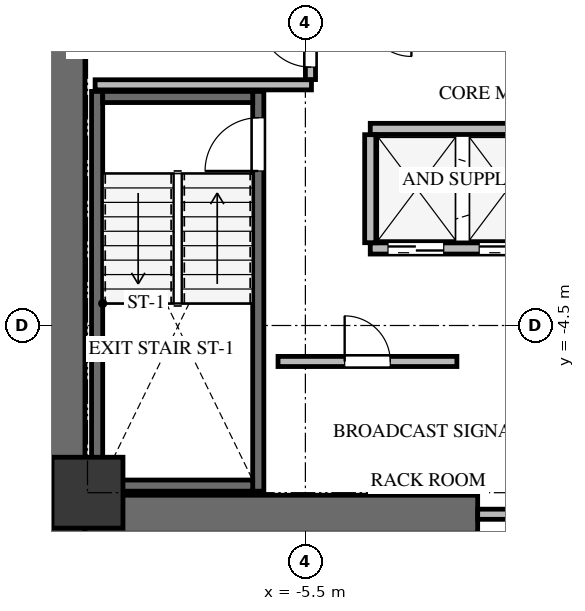
"""IFC4 building model, lengths in metres.
Left out: names, types, materials, properties, quantities, classifications, styles, units other than length and angle.
Written with IfcOpenShell. Run it as: python <this file> out.ifc"""

import sys

from ifc_helpers import new_model, si_unit, direction, frame, frame_2d, origin, origin_2d, place, context, subcontext, project, spatial, rectangle, extrude, source, transform, mapped, element, fill, save


model = new_model("IFC4")
c1 = context("Model", 3, precision=1e-05, world=origin(), true_north=direction((0.0, 1.0)))
c2 = subcontext(c1, "Body", "Model", "MODEL_VIEW")
j1 = project(units=[si_unit("LENGTHUNIT", "METRE"), si_unit("PLANEANGLEUNIT", "RADIAN")], contexts=[c1])
p1 = place(None, origin())
s1 = spatial("IfcSite", under=j1, at=p1, CompositionType="ELEMENT")
p2 = place(p1, origin())
s2 = spatial("IfcBuilding", under=s1, at=p2, CompositionType="ELEMENT")
p3 = place(p2, frame((0.0, 0.0, 104.1)))
s3 = spatial("IfcBuildingStorey", under=s2, at=p3, CompositionType="ELEMENT", Elevation=104.1)
p4 = place(p3, frame((-10.225, -8.6, 0.0), z_axis=(0.0, 0.0, 1.0), x_axis=(0.0, 1.0, 0.0)))
e1 = element("IfcWall", 1, at=p4, inside=s3, PredefinedType="SHEAR", context=c2, shape_type="SweptSolid", body=[
    extrude(rectangle(XDim=17.2, YDim=0.75, at=frame_2d((8.6, 0.0))), origin(), (0.0, 0.0, 1.0), 3.3),
])
p5 = place(p3, frame((-9.85, -8.225, 0.0), z_axis=(0.0, 0.0, 1.0), x_axis=(1.0, 0.0, 0.0)))
e2 = element("IfcWall", 2, at=p5, inside=s3, PredefinedType="SHEAR", context=c2, shape_type="SweptSolid", body=[
    extrude(rectangle(XDim=7.75, YDim=0.75, at=frame_2d((3.875, 0.0))), origin(), (0.0, 0.0, 1.0), 3.3),
])
p6 = place(p3, frame((-6.43, -7.77, -0.24), z_axis=(0.0, 0.0, 1.0), x_axis=(0.0, 1.0, 0.0)))
e3 = element("IfcWall", 3, at=p6, inside=s3, PredefinedType="SHEAR", context=c2, shape_type="SweptSolid", body=[
    extrude(rectangle(XDim=7.89, YDim=0.22, at=frame_2d((3.945, 0.0))), origin(), (0.0, 0.0, 1.0), 3.3),
])
p7 = place(p6, frame((6.32, 0.0, 0.0)))
e4 = element("IfcOpeningElement", 4, at=p7, cuts=e3, PredefinedType="OPENING", context=c2, shape_type="SweptSolid", body=[
    extrude(rectangle(XDim=1.05, YDim=2.15, at=frame_2d((0.525, 1.075))), frame((0.0, 0.12, 0.0), z_axis=(0.0, -1.0, 0.0), x_axis=(1.0, 0.0, 0.0)), (0.0, 0.0, 1.0), 0.24),
])
p8 = place(p3, frame((-9.61, 0.12, -0.24), z_axis=(0.0, 0.0, 1.0), x_axis=(0.0, -1.0, 0.0)))
e5 = element("IfcWall", 5, at=p8, inside=s3, PredefinedType="SHEAR", context=c2, shape_type="SweptSolid", body=[
    extrude(rectangle(XDim=7.89, YDim=0.22, at=frame_2d((3.945, 0.0))), origin(), (0.0, 0.0, 1.0), 3.3),
])
for number, where, z_axis, x_axis in (
    (6, (-9.5, -7.66, -0.24), (0.0, 0.0, 1.0), (1.0, 0.0, 0.0)),
    (7, (-6.54, 0.01, -0.24), (0.0, 0.0, 1.0), (-1.0, 0.0, 0.0)),
):
    element("IfcWall", number, at=place(p3, frame(where, z_axis=z_axis, x_axis=x_axis)), inside=s3, PredefinedType="SHEAR", context=c2, shape_type="SweptSolid", body=[
        extrude(rectangle(XDim=2.96, YDim=0.22, at=frame_2d((1.48, 0.0))), origin(), (0.0, 0.0, 1.0), 3.3),
    ])
m1 = source(origin(), c2, "Body", "SweptSolid", [
    extrude(rectangle(XDim=1.4, YDim=1.4, at=origin_2d()), origin(), (0.0, 0.0, 1.0), 3.3),
])
p9 = place(p3, frame((-9.8, -7.8, -0.24), z_axis=(0.0, 0.0, 1.0), x_axis=(1.0, 0.0, 0.0)))
e8 = element("IfcColumn", 8, at=p9, inside=s3, PredefinedType="COLUMN", context=c2, shape_type="MappedRepresentation", body=[
    mapped(m1, transform((0.0, 0.0, 0.0), x_axis=(1.0, 0.0, 0.0), y_axis=(0.0, 1.0, 0.0), z_axis=(0.0, 0.0, 1.0), scale=1.0)),
])
p10 = place(p3, frame((-2.1, -8.225, 0.0), z_axis=(0.0, 0.0, 1.0), x_axis=(1.0, 0.0, 0.0)))
e9 = element("IfcWall", 9, at=p10, inside=s3, PredefinedType="SOLIDWALL", context=c2, shape_type="SweptSolid", body=[
    extrude(rectangle(XDim=4.2, YDim=0.2, at=frame_2d((2.1, 0.0))), origin(), (0.0, 0.0, 1.0), 3.045),
])
p11 = place(p10, frame((1.2, 0.0, 0.0)))
e10 = element("IfcOpeningElement", 10, at=p11, cuts=e9, PredefinedType="OPENING", context=c2, shape_type="SweptSolid", body=[
    extrude(rectangle(XDim=1.8, YDim=2.15, at=frame_2d((0.9, 1.075))), frame((0.0, 0.11, 0.0), z_axis=(0.0, -1.0, 0.0), x_axis=(1.0, 0.0, 0.0)), (0.0, 0.0, 1.0), 0.22),
])
p12 = place(p3, frame((-9.65, 0.25, 0.0), z_axis=(0.0, 0.0, 1.0), x_axis=(1.0, 0.0, 0.0)))
e11 = element("IfcWall", 11, at=p12, inside=s3, PredefinedType="SOLIDWALL", context=c2, shape_type="SweptSolid", body=[
    extrude(rectangle(XDim=4.27, YDim=0.2, at=frame_2d((2.135, 0.0))), origin(), (0.0, 0.0, 1.0), 3.045),
])
p13 = place(p3, frame((-5.4, 0.354, 0.0), z_axis=(0.0, 0.0, 1.0), x_axis=(0.0, 1.0, 0.0)))
e12 = element("IfcWall", 12, at=p13, inside=s3, PredefinedType="SOLIDWALL", context=c2, shape_type="SweptSolid", body=[
    extrude(rectangle(XDim=4.026, YDim=0.2, at=frame_2d((2.013, 0.0))), origin(), (0.0, 0.0, 1.0), 3.045),
])
p14 = place(p13, frame((0.246, 0.0, 0.0)))
e13 = element("IfcOpeningElement", 13, at=p14, cuts=e12, PredefinedType="OPENING", context=c2, shape_type="SweptSolid", body=[
    extrude(rectangle(XDim=1.0, YDim=2.15, at=frame_2d((0.5, 1.075))), frame((0.0, 0.11, 0.0), z_axis=(0.0, -1.0, 0.0), x_axis=(1.0, 0.0, 0.0)), (0.0, 0.0, 1.0), 0.22),
])
p15 = place(p3, frame((-4.22, -2.98, 0.0), z_axis=(0.0, 0.0, 1.0), x_axis=(1.0, 0.0, 0.0)))
e14 = element("IfcWall", 14, at=p15, inside=s3, PredefinedType="SOLIDWALL", context=c2, shape_type="SweptSolid", body=[
    extrude(rectangle(XDim=7.24, YDim=0.22, at=frame_2d((3.62, 0.0))), origin(), (0.0, 0.0, 1.0), 3.045),
])
p16 = place(p15, frame((0.35, 0.0, 0.0)))
e15 = element("IfcOpeningElement", 15, at=p16, cuts=e14, PredefinedType="OPENING", context=c2, shape_type="SweptSolid", body=[
    extrude(rectangle(XDim=1.1, YDim=2.15, at=frame_2d((0.55, 1.075))), frame((0.0, 0.12, 0.0), z_axis=(0.0, -1.0, 0.0), x_axis=(1.0, 0.0, 0.0)), (0.0, 0.0, 1.0), 0.24),
])
p17 = place(p15, frame((2.15, 0.0, 0.0)))
e16 = element("IfcOpeningElement", 16, at=p17, cuts=e14, PredefinedType="OPENING", context=c2, shape_type="SweptSolid", body=[
    extrude(rectangle(XDim=1.1, YDim=2.15, at=frame_2d((0.55, 1.075))), frame((0.0, 0.12, 0.0), z_axis=(0.0, -1.0, 0.0), x_axis=(1.0, 0.0, 0.0)), (0.0, 0.0, 1.0), 0.24),
])
p18 = place(p15, frame((3.95, 0.0, 0.0)))
e17 = element("IfcOpeningElement", 17, at=p18, cuts=e14, PredefinedType="OPENING", context=c2, shape_type="SweptSolid", body=[
    extrude(rectangle(XDim=1.1, YDim=2.15, at=frame_2d((0.55, 1.075))), frame((0.0, 0.12, 0.0), z_axis=(0.0, -1.0, 0.0), x_axis=(1.0, 0.0, 0.0)), (0.0, 0.0, 1.0), 0.24),
])
p19 = place(p15, frame((5.75, 0.0, 0.0)))
e18 = element("IfcOpeningElement", 18, at=p19, cuts=e14, PredefinedType="OPENING", context=c2, shape_type="SweptSolid", body=[
    extrude(rectangle(XDim=1.1, YDim=2.15, at=frame_2d((0.55, 1.075))), frame((0.0, 0.12, 0.0), z_axis=(0.0, -1.0, 0.0), x_axis=(1.0, 0.0, 0.0)), (0.0, 0.0, 1.0), 0.24),
])
p20 = place(p3, frame((-4.22, -0.62, 0.0), z_axis=(0.0, 0.0, 1.0), x_axis=(1.0, 0.0, 0.0)))
e19 = element("IfcWall", 19, at=p20, inside=s3, PredefinedType="SOLIDWALL", context=c2, shape_type="SweptSolid", body=[
    extrude(rectangle(XDim=7.24, YDim=0.22, at=frame_2d((3.62, 0.0))), origin(), (0.0, 0.0, 1.0), 3.045),
])
p21 = place(p3, frame((-4.22, -2.866, 0.0), z_axis=(0.0, 0.0, 1.0), x_axis=(0.0, 1.0, 0.0)))
e20 = element("IfcWall", 20, at=p21, inside=s3, PredefinedType="SOLIDWALL", context=c2, shape_type="SweptSolid", body=[
    extrude(rectangle(XDim=2.132, YDim=0.22, at=frame_2d((1.066, 0.0))), origin(), (0.0, 0.0, 1.0), 3.045),
])
p22 = place(p3, frame((-6.04, -5.21, 0.0), z_axis=(0.0, 0.0, 1.0), x_axis=(1.0, 0.0, 0.0)))
e21 = element("IfcWall", 21, at=p22, inside=s3, PredefinedType="SOLIDWALL", context=c2, shape_type="SweptSolid", body=[
    extrude(rectangle(XDim=3.53, YDim=0.2, at=frame_2d((1.765, 0.0))), origin(), (0.0, 0.0, 1.0), 3.045),
])
p23 = place(p22, frame((1.315, 0.0, 0.0)))
e22 = element("IfcOpeningElement", 22, at=p23, cuts=e21, PredefinedType="OPENING", context=c2, shape_type="SweptSolid", body=[
    extrude(rectangle(XDim=0.9, YDim=2.05, at=frame_2d((0.45, 1.025))), frame((0.0, 0.11, 0.0), z_axis=(0.0, -1.0, 0.0), x_axis=(1.0, 0.0, 0.0)), (0.0, 0.0, 1.0), 0.22),
])
m2 = source(origin(), c2, "Body", "SweptSolid", [
    extrude(rectangle(XDim=1.05, YDim=2.15, at=frame_2d((0.525, 1.075))), frame((0.0, 0.025, 0.0), z_axis=(0.0, -1.0, 0.0), x_axis=(1.0, 0.0, 0.0)), (0.0, 0.0, 1.0), 0.05),
])
p24 = place(p7, origin())
e23 = element("IfcDoor", 23, at=p24, inside=s3, OperationType="SINGLE_SWING_LEFT", PredefinedType="DOOR", context=c2, shape_type="MappedRepresentation", body=[
    mapped(m2, transform((0.0, 0.0, 0.0), x_axis=(1.0, 0.0, 0.0), y_axis=(0.0, 1.0, 0.0), z_axis=(0.0, 0.0, 1.0), scale=1.0)),
])
fill(e4, e23)
m3 = source(origin(), c2, "Body", "SweptSolid", [
    extrude(rectangle(XDim=1.0, YDim=2.15, at=frame_2d((0.5, 1.075))), frame((0.0, 0.025, 0.0), z_axis=(0.0, -1.0, 0.0), x_axis=(1.0, 0.0, 0.0)), (0.0, 0.0, 1.0), 0.05),
])
p25 = place(p14, origin())
e24 = element("IfcDoor", 24, at=p25, inside=s3, OperationType="SINGLE_SWING_RIGHT", PredefinedType="DOOR", context=c2, shape_type="MappedRepresentation", body=[
    mapped(m3, transform((0.0, 0.0, 0.0), x_axis=(1.0, 0.0, 0.0), y_axis=(0.0, 1.0, 0.0), z_axis=(0.0, 0.0, 1.0), scale=1.0)),
])
fill(e13, e24)
m4 = source(origin(), c2, "Body", "SweptSolid", [
    extrude(rectangle(XDim=1.1, YDim=2.15, at=frame_2d((0.55, 1.075))), frame((0.0, 0.025, 0.0), z_axis=(0.0, -1.0, 0.0), x_axis=(1.0, 0.0, 0.0)), (0.0, 0.0, 1.0), 0.05),
])
p26 = place(p16, origin())
e25 = element("IfcDoor", 25, at=p26, inside=s3, OperationType="DOUBLE_DOOR_SLIDING", PredefinedType="DOOR", context=c2, shape_type="MappedRepresentation", body=[
    mapped(m4, transform((0.0, 0.0, 0.0), x_axis=(1.0, 0.0, 0.0), y_axis=(0.0, 1.0, 0.0), z_axis=(0.0, 0.0, 1.0), scale=1.0)),
])
fill(e15, e25)
p27 = place(p17, origin())
e26 = element("IfcDoor", 26, at=p27, inside=s3, OperationType="DOUBLE_DOOR_SLIDING", PredefinedType="DOOR", context=c2, shape_type="MappedRepresentation", body=[
    mapped(m4, transform((0.0, 0.0, 0.0), x_axis=(1.0, 0.0, 0.0), y_axis=(0.0, 1.0, 0.0), z_axis=(0.0, 0.0, 1.0), scale=1.0)),
])
fill(e16, e26)
m5 = source(origin(), c2, "Body", "SweptSolid", [
    extrude(rectangle(XDim=0.9, YDim=2.05, at=frame_2d((0.45, 1.025))), frame((0.0, 0.025, 0.0), z_axis=(0.0, -1.0, 0.0), x_axis=(1.0, 0.0, 0.0)), (0.0, 0.0, 1.0), 0.05),
])
p28 = place(p23, origin())
e27 = element("IfcDoor", 27, at=p28, inside=s3, OperationType="SINGLE_SWING_LEFT", PredefinedType="DOOR", context=c2, shape_type="MappedRepresentation", body=[
    mapped(m5, transform((0.0, 0.0, 0.0), x_axis=(1.0, 0.0, 0.0), y_axis=(0.0, 1.0, 0.0), z_axis=(0.0, 0.0, 1.0), scale=1.0)),
])
fill(e22, e27)
save(model, sys.argv[1])
